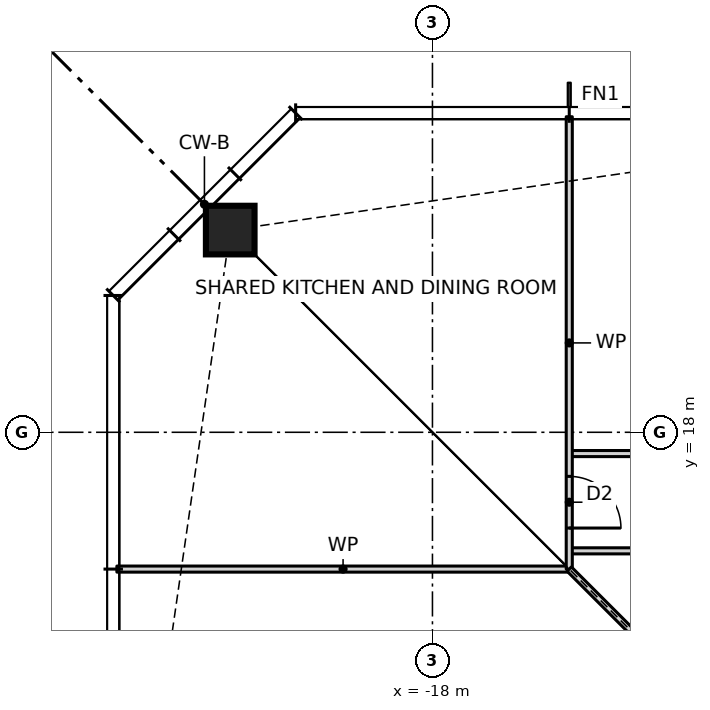
"""IFC4 building model, lengths in metres.
Left out: names, types, materials, properties, quantities, classifications, styles, units other than length and angle.
Written with IfcOpenShell. Run it as: python <this file> out.ifc"""

import sys

from ifc_helpers import new_model, si_unit, direction, frame, frame_2d, origin, origin_2d, place, context, subcontext, project, spatial, rectangle, hollow_rectangle, extrude, element, fill, save


model = new_model("IFC4")
c1 = context("Model", 3, precision=1e-05, world=origin(), true_north=direction((0.0, 1.0)))
c2 = subcontext(c1, "Body", "Model", "MODEL_VIEW")
j1 = project(units=[si_unit("LENGTHUNIT", "METRE"), si_unit("PLANEANGLEUNIT", "RADIAN")], contexts=[c1])
p1 = place(None, origin())
s1 = spatial("IfcSite", under=j1, at=p1, CompositionType="ELEMENT")
p2 = place(p1, origin())
s2 = spatial("IfcBuilding", under=s1, at=p2, CompositionType="ELEMENT")
p3 = place(p2, frame((0.0, 0.0, 39.5)))
s3 = spatial("IfcBuildingStorey", under=s2, at=p3, CompositionType="ELEMENT", Elevation=39.5)
p4 = place(p3, frame((-21.326, 21.326, 0.0), z_axis=(0.0, 0.0, 1.0), x_axis=(1.0, 0.0, 0.0)))
e1 = element("IfcColumn", 1, at=p4, inside=s3, PredefinedType="COLUMN", context=c2, shape_type="SweptSolid", body=[
    extrude(hollow_rectangle(XDim=0.8, YDim=0.8, WallThickness=0.09, at=origin_2d()), origin(), (0.0, 0.0, 1.0), 3.5),
])
p5 = place(p3, frame((-23.19, 15.75, 0.0), z_axis=(0.0, 0.0, 1.0), x_axis=(1.0, 0.0, 0.0)))
e2 = element("IfcWall", 2, at=p5, inside=s3, PredefinedType="PARTITIONING", context=c2, shape_type="SweptSolid", body=[
    extrude(rectangle(XDim=7.44, YDim=0.1, at=frame_2d((3.72, 0.0))), origin(), (0.0, 0.0, 1.0), 3.27),
])
p6 = place(p3, frame((-15.75, 16.05, 0.0), z_axis=(0.0, 0.0, 1.0), x_axis=(1.0, 0.0, 0.0)))
e3 = element("IfcWall", 3, at=p6, inside=s3, PredefinedType="PARTITIONING", context=c2, shape_type="SweptSolid", body=[
    extrude(rectangle(XDim=17.9, YDim=0.1, at=frame_2d((8.95, 0.0))), origin(), (0.0, 0.0, 1.0), 3.27),
])
p7 = place(p6, frame((8.525, 0.0, 0.0)))
e4 = element("IfcOpeningElement", 4, at=p7, cuts=e3, PredefinedType="OPENING", context=c2, shape_type="SweptSolid", body=[
    extrude(rectangle(XDim=0.85, YDim=2.1, at=frame_2d((0.425, 1.05))), frame((0.0, 0.06, 0.0), z_axis=(0.0, -1.0, 0.0), x_axis=(1.0, 0.0, 0.0)), (0.0, 0.0, 1.0), 0.12),
])
p8 = place(p3, frame((-15.75, 17.65, 0.0), z_axis=(0.0, 0.0, 1.0), x_axis=(1.0, 0.0, 0.0)))
e5 = element("IfcWall", 5, at=p8, inside=s3, PredefinedType="PARTITIONING", context=c2, shape_type="SweptSolid", body=[
    extrude(rectangle(XDim=31.5, YDim=0.1, at=frame_2d((15.75, 0.0))), origin(), (0.0, 0.0, 1.0), 3.27),
])
p9 = place(p8, frame((28.8, 0.0, 0.0)))
e6 = element("IfcOpeningElement", 6, at=p9, cuts=e5, PredefinedType="OPENING", context=c2, shape_type="SweptSolid", body=[
    extrude(rectangle(XDim=0.9, YDim=2.1, at=frame_2d((0.45, 1.05))), frame((0.0, 0.06, 0.0), z_axis=(0.0, -1.0, 0.0), x_axis=(1.0, 0.0, 0.0)), (0.0, 0.0, 1.0), 0.12),
])
p10 = place(p8, frame((24.3, 0.0, 0.0)))
e7 = element("IfcOpeningElement", 7, at=p10, cuts=e5, PredefinedType="OPENING", context=c2, shape_type="SweptSolid", body=[
    extrude(rectangle(XDim=0.9, YDim=2.1, at=frame_2d((0.45, 1.05))), frame((0.0, 0.06, 0.0), z_axis=(0.0, -1.0, 0.0), x_axis=(1.0, 0.0, 0.0)), (0.0, 0.0, 1.0), 0.12),
])
p11 = place(p8, frame((19.8, 0.0, 0.0)))
e8 = element("IfcOpeningElement", 8, at=p11, cuts=e5, PredefinedType="OPENING", context=c2, shape_type="SweptSolid", body=[
    extrude(rectangle(XDim=0.9, YDim=2.1, at=frame_2d((0.45, 1.05))), frame((0.0, 0.06, 0.0), z_axis=(0.0, -1.0, 0.0), x_axis=(1.0, 0.0, 0.0)), (0.0, 0.0, 1.0), 0.12),
])
p12 = place(p8, frame((15.3, 0.0, 0.0)))
e9 = element("IfcOpeningElement", 9, at=p12, cuts=e5, PredefinedType="OPENING", context=c2, shape_type="SweptSolid", body=[
    extrude(rectangle(XDim=0.9, YDim=2.1, at=frame_2d((0.45, 1.05))), frame((0.0, 0.06, 0.0), z_axis=(0.0, -1.0, 0.0), x_axis=(1.0, 0.0, 0.0)), (0.0, 0.0, 1.0), 0.12),
])
p13 = place(p8, frame((10.8, 0.0, 0.0)))
e10 = element("IfcOpeningElement", 10, at=p13, cuts=e5, PredefinedType="OPENING", context=c2, shape_type="SweptSolid", body=[
    extrude(rectangle(XDim=0.9, YDim=2.1, at=frame_2d((0.45, 1.05))), frame((0.0, 0.06, 0.0), z_axis=(0.0, -1.0, 0.0), x_axis=(1.0, 0.0, 0.0)), (0.0, 0.0, 1.0), 0.12),
])
p14 = place(p8, frame((6.3, 0.0, 0.0)))
e11 = element("IfcOpeningElement", 11, at=p14, cuts=e5, PredefinedType="OPENING", context=c2, shape_type="SweptSolid", body=[
    extrude(rectangle(XDim=0.9, YDim=2.1, at=frame_2d((0.45, 1.05))), frame((0.0, 0.06, 0.0), z_axis=(0.0, -1.0, 0.0), x_axis=(1.0, 0.0, 0.0)), (0.0, 0.0, 1.0), 0.12),
])
p15 = place(p8, frame((1.8, 0.0, 0.0)))
e12 = element("IfcOpeningElement", 12, at=p15, cuts=e5, PredefinedType="OPENING", context=c2, shape_type="SweptSolid", body=[
    extrude(rectangle(XDim=0.9, YDim=2.1, at=frame_2d((0.45, 1.05))), frame((0.0, 0.06, 0.0), z_axis=(0.0, -1.0, 0.0), x_axis=(1.0, 0.0, 0.0)), (0.0, 0.0, 1.0), 0.12),
])
p16 = place(p3, frame((-15.75, 15.75, 0.0), z_axis=(0.0, 0.0, 1.0), x_axis=(0.0, 1.0, 0.0)))
e13 = element("IfcWall", 13, at=p16, inside=s3, PredefinedType="PARTITIONING", context=c2, shape_type="SweptSolid", body=[
    extrude(rectangle(XDim=7.44, YDim=0.1, at=frame_2d((3.72, 0.0))), origin(), (0.0, 0.0, 1.0), 3.27),
])
p17 = place(p16, frame((0.675, 0.0, 0.0)))
e14 = element("IfcOpeningElement", 14, at=p17, cuts=e13, PredefinedType="OPENING", context=c2, shape_type="SweptSolid", body=[
    extrude(rectangle(XDim=0.85, YDim=2.1, at=frame_2d((0.425, 1.05))), frame((0.0, 0.06, 0.0), z_axis=(0.0, -1.0, 0.0), x_axis=(1.0, 0.0, 0.0)), (0.0, 0.0, 1.0), 0.12),
])
p18 = place(p3, frame((-11.6, 11.6, 0.0), z_axis=(0.0, 0.0, 1.0), x_axis=(-0.707106781187, 0.707106781187, 0.0)))
e15 = element("IfcWall", 15, at=p18, inside=s3, PredefinedType="PARTITIONING", context=c2, shape_type="SweptSolid", body=[
    extrude(rectangle(XDim=5.869, YDim=0.1, at=frame_2d((2.935, 0.0))), origin(), (0.0, 0.0, 1.0), 2.343),
])
p19 = place(p17, frame((0.85, 0.0, 0.0), z_axis=(0.0, 0.0, 1.0), x_axis=(-1.0, 0.0, 0.0)))
e16 = element("IfcDoor", 16, at=p19, inside=s3, OperationType="SINGLE_SWING_RIGHT", PredefinedType="DOOR", context=c2, shape_type="SweptSolid", body=[
    extrude(rectangle(XDim=0.85, YDim=2.1, at=frame_2d((0.425, 1.05))), frame((0.0, 0.025, 0.0), z_axis=(0.0, -1.0, 0.0), x_axis=(1.0, 0.0, 0.0)), (0.0, 0.0, 1.0), 0.05),
])
fill(e14, e16)
save(model, sys.argv[1])
